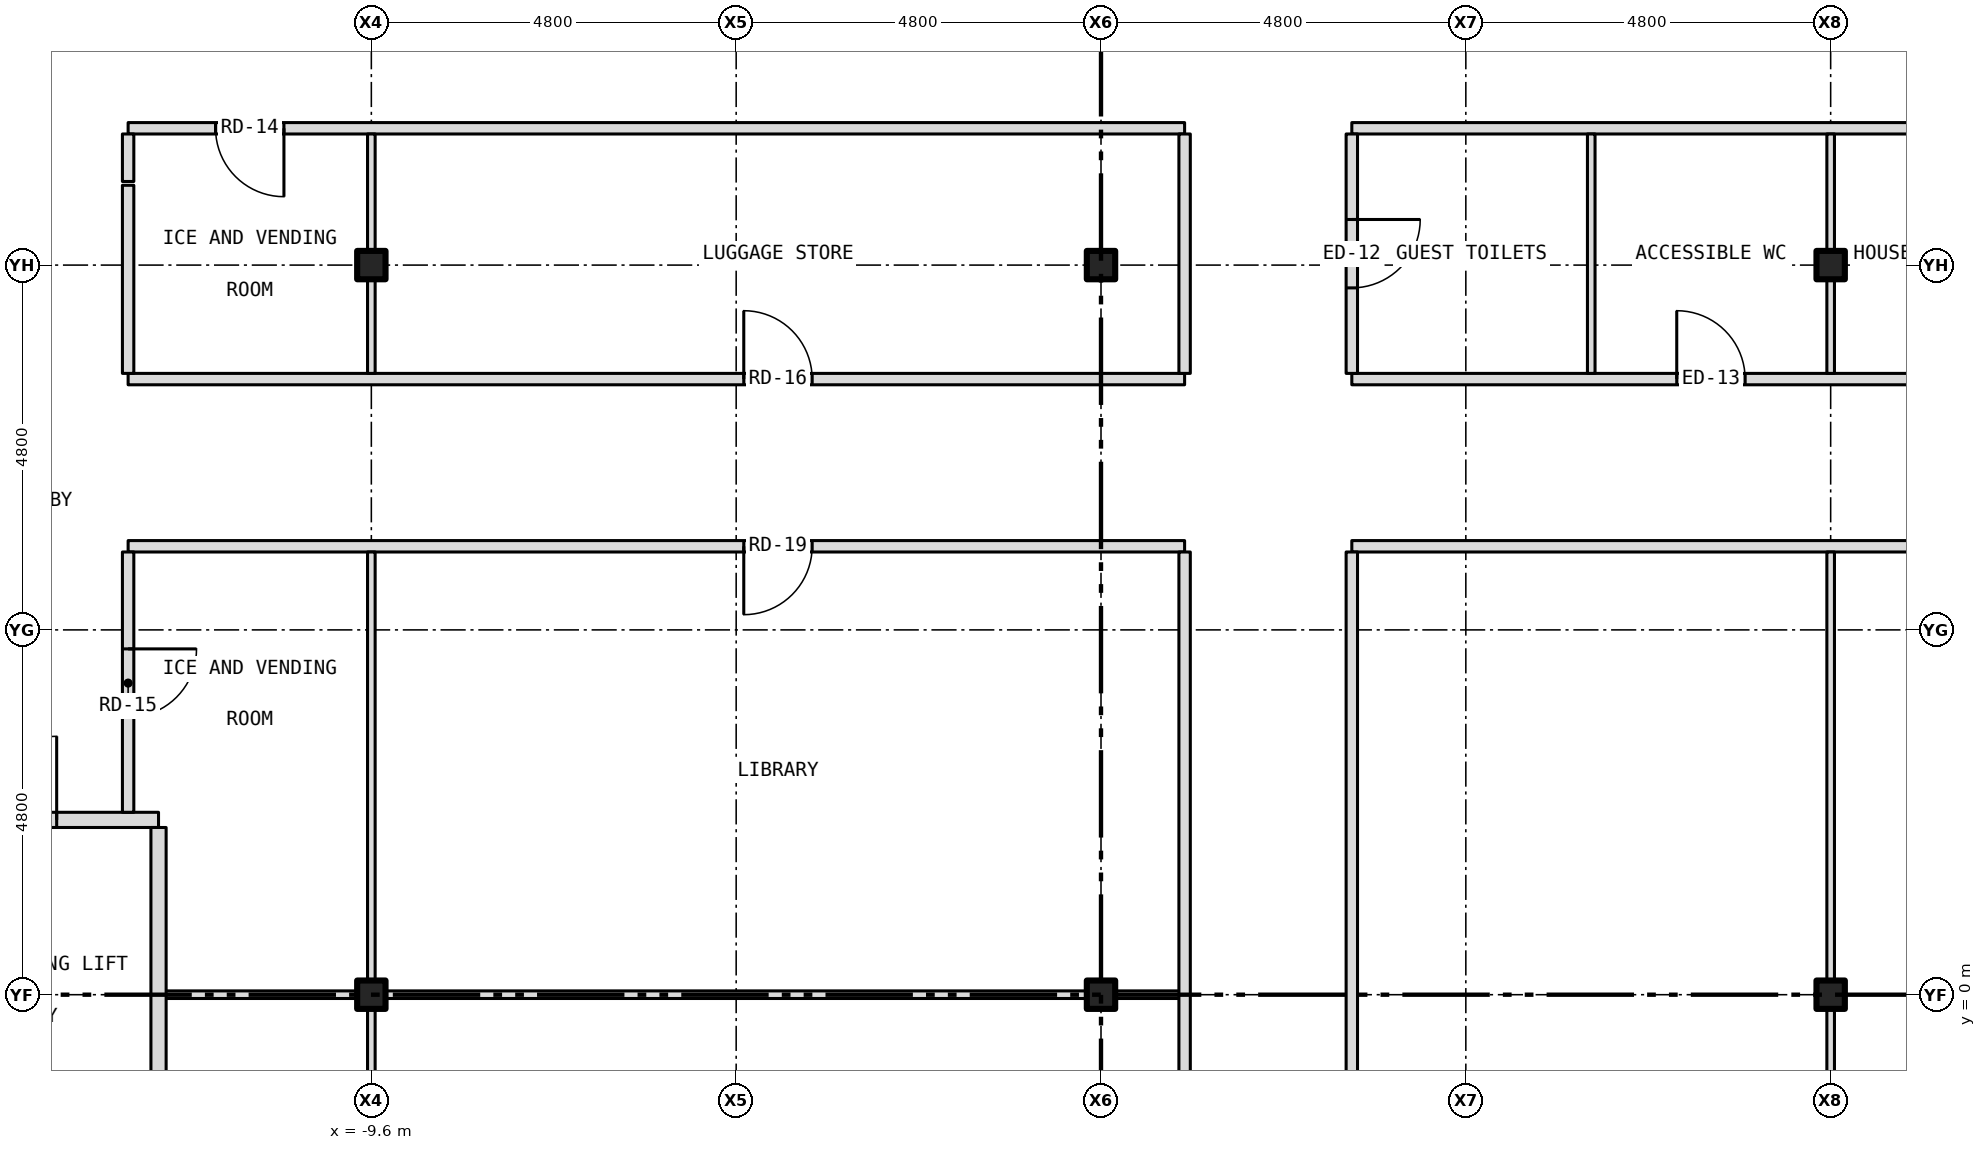
"""IFC4 building model, lengths in metres.
Left out: names, types, materials, properties, quantities, classifications, styles, units other than length and angle.
Written with IfcOpenShell. Run it as: python <this file> out.ifc"""

import sys

from ifc_helpers import new_model, si_unit, direction, frame, frame_2d, origin, origin_2d, place, context, subcontext, project, spatial, rectangle, i_section, extrude, element, fill, save


model = new_model("IFC4")
c1 = context("Model", 3, precision=1e-05, world=origin(), true_north=direction((0.0, 1.0)))
c2 = subcontext(c1, "Body", "Model", "MODEL_VIEW")
j1 = project(units=[si_unit("LENGTHUNIT", "METRE"), si_unit("PLANEANGLEUNIT", "RADIAN")], contexts=[c1])
p1 = place(None, origin())
s1 = spatial("IfcSite", under=j1, at=p1, CompositionType="ELEMENT")
p2 = place(p1, origin())
s2 = spatial("IfcBuilding", under=s1, at=p2, CompositionType="ELEMENT")
p3 = place(p2, frame((0.0, 0.0, 169.0)))
s3 = spatial("IfcBuildingStorey", under=s2, at=p3, CompositionType="ELEMENT", Elevation=169.0)
for number, where, z_axis, x_axis in (
    (1, (-9.6, 0.0, -0.15), (0.0, 0.0, 1.0), (1.0, 0.0, 0.0)),
    (2, (-9.6, 9.6, -0.15), (0.0, 0.0, 1.0), (1.0, 0.0, 0.0)),
    (3, (0.0, 0.0, -0.15), (0.0, 0.0, 1.0), (1.0, 0.0, 0.0)),
    (4, (0.0, 9.6, -0.15), (0.0, 0.0, 1.0), (1.0, 0.0, 0.0)),
    (5, (9.6, 0.0, -0.15), (0.0, 0.0, 1.0), (1.0, 0.0, 0.0)),
    (6, (9.6, 9.6, -0.15), (0.0, 0.0, 1.0), (1.0, 0.0, 0.0)),
):
    element("IfcColumn", number, at=place(p3, frame(where, z_axis=z_axis, x_axis=x_axis)), inside=s3, PredefinedType="COLUMN", context=c2, shape_type="SweptSolid", body=[
        extrude(i_section(OverallWidth=0.373, OverallDepth=0.373, WebThickness=0.016, FlangeThickness=0.026, at=origin_2d()), origin(), (0.0, 0.0, 1.0), 3.5),
    ])
p4 = place(p3, frame((-12.4, 0.0, 0.0), z_axis=(0.0, 0.0, 1.0), x_axis=(1.0, 0.0, 0.0)))
e7 = element("IfcWall", 7, at=p4, inside=s3, PredefinedType="PARTITIONING", context=c2, shape_type="SweptSolid", body=[
    extrude(rectangle(XDim=2.613, YDim=0.1, at=frame_2d((1.306, 0.0))), origin(), (0.0, 0.0, 1.0), 2.728),
])
p5 = place(p3, frame((-9.787, 0.0, 0.0), z_axis=(0.0, 0.0, 1.0), x_axis=(1.0, 0.0, 0.0)))
e8 = element("IfcWall", 8, at=p5, inside=s3, PredefinedType="PARTITIONING", context=c2, shape_type="SweptSolid", body=[
    extrude(rectangle(XDim=0.374, YDim=0.1, at=frame_2d((0.187, 0.0))), origin(), (0.0, 0.0, 1.0), 3.35),
])
p6 = place(p3, frame((-9.413, 0.0, 0.0), z_axis=(0.0, 0.0, 1.0), x_axis=(1.0, 0.0, 0.0)))
e9 = element("IfcWall", 9, at=p6, inside=s3, PredefinedType="PARTITIONING", context=c2, shape_type="SweptSolid", body=[
    extrude(rectangle(XDim=9.226, YDim=0.1, at=frame_2d((4.613, 0.0))), origin(), (0.0, 0.0, 1.0), 2.728),
])
p7 = place(p3, frame((-0.187, 0.0, 0.0), z_axis=(0.0, 0.0, 1.0), x_axis=(1.0, 0.0, 0.0)))
e10 = element("IfcWall", 10, at=p7, inside=s3, PredefinedType="PARTITIONING", context=c2, shape_type="SweptSolid", body=[
    extrude(rectangle(XDim=0.374, YDim=0.1, at=frame_2d((0.187, 0.0))), origin(), (0.0, 0.0, 1.0), 3.35),
])
p8 = place(p3, frame((0.187, 0.0, 0.0), z_axis=(0.0, 0.0, 1.0), x_axis=(1.0, 0.0, 0.0)))
e11 = element("IfcWall", 11, at=p8, inside=s3, PredefinedType="PARTITIONING", context=c2, shape_type="SweptSolid", body=[
    extrude(rectangle(XDim=0.913, YDim=0.1, at=frame_2d((0.457, 0.0))), origin(), (0.0, 0.0, 1.0), 2.728),
])
p9 = place(p3, frame((-15.68, 2.3, 0.0), z_axis=(0.0, 0.0, 1.0), x_axis=(1.0, 0.0, 0.0)))
e12 = element("IfcWall", 12, at=p9, inside=s3, PredefinedType="PARTITIONING", context=c2, shape_type="SweptSolid", body=[
    extrude(rectangle(XDim=3.28, YDim=0.2, at=frame_2d((1.64, 0.0))), origin(), (0.0, 0.0, 1.0), 3.35),
])
p10 = place(p9, frame((0.84, 0.0, 0.0)))
e13 = element("IfcOpeningElement", 13, at=p10, cuts=e12, PredefinedType="OPENING", context=c2, shape_type="SweptSolid", body=[
    extrude(rectangle(XDim=1.1, YDim=2.1, at=frame_2d((0.55, 1.05))), frame((0.0, 0.112, 0.0), z_axis=(0.0, -1.0, 0.0), x_axis=(1.0, 0.0, 0.0)), (0.0, 0.0, 1.0), 0.224),
])
p11 = place(p3, frame((-12.8, 5.9, 0.0), z_axis=(0.0, 0.0, 1.0), x_axis=(1.0, 0.0, 0.0)))
e14 = element("IfcWall", 14, at=p11, inside=s3, PredefinedType="PARTITIONING", context=c2, shape_type="SweptSolid", body=[
    extrude(rectangle(XDim=13.9, YDim=0.15, at=frame_2d((6.95, 0.0))), origin(), (0.0, 0.0, 1.0), 3.35),
])
p12 = place(p11, frame((8.1, 0.0, 0.0)))
e15 = element("IfcOpeningElement", 15, at=p12, cuts=e14, PredefinedType="OPENING", context=c2, shape_type="SweptSolid", body=[
    extrude(rectangle(XDim=0.9, YDim=2.1, at=frame_2d((0.45, 1.05))), frame((0.0, 0.087, 0.0), z_axis=(0.0, -1.0, 0.0), x_axis=(1.0, 0.0, 0.0)), (0.0, 0.0, 1.0), 0.174),
])
p13 = place(p3, frame((3.3, 5.9, 0.0), z_axis=(0.0, 0.0, 1.0), x_axis=(1.0, 0.0, 0.0)))
e16 = element("IfcWall", 16, at=p13, inside=s3, PredefinedType="PARTITIONING", context=c2, shape_type="SweptSolid", body=[
    extrude(rectangle(XDim=9.5, YDim=0.15, at=frame_2d((4.75, 0.0))), origin(), (0.0, 0.0, 1.0), 3.35),
])
p14 = place(p3, frame((-12.8, 8.1, 0.0), z_axis=(0.0, 0.0, 1.0), x_axis=(1.0, 0.0, 0.0)))
e17 = element("IfcWall", 17, at=p14, inside=s3, PredefinedType="PARTITIONING", context=c2, shape_type="SweptSolid", body=[
    extrude(rectangle(XDim=13.9, YDim=0.15, at=frame_2d((6.95, 0.0))), origin(), (0.0, 0.0, 1.0), 3.35),
])
p15 = place(p14, frame((8.1, 0.0, 0.0)))
e18 = element("IfcOpeningElement", 18, at=p15, cuts=e17, PredefinedType="OPENING", context=c2, shape_type="SweptSolid", body=[
    extrude(rectangle(XDim=0.9, YDim=2.1, at=frame_2d((0.45, 1.05))), frame((0.0, 0.087, 0.0), z_axis=(0.0, -1.0, 0.0), x_axis=(1.0, 0.0, 0.0)), (0.0, 0.0, 1.0), 0.174),
])
p16 = place(p3, frame((3.3, 8.1, 0.0), z_axis=(0.0, 0.0, 1.0), x_axis=(1.0, 0.0, 0.0)))
e19 = element("IfcWall", 19, at=p16, inside=s3, PredefinedType="PARTITIONING", context=c2, shape_type="SweptSolid", body=[
    extrude(rectangle(XDim=9.5, YDim=0.15, at=frame_2d((4.75, 0.0))), origin(), (0.0, 0.0, 1.0), 3.35),
])
p17 = place(p16, frame((7.45, 0.0, 0.0)))
e20 = element("IfcOpeningElement", 20, at=p17, cuts=e19, PredefinedType="OPENING", context=c2, shape_type="SweptSolid", body=[
    extrude(rectangle(XDim=0.9, YDim=2.1, at=frame_2d((0.45, 1.05))), frame((0.0, 0.087, 0.0), z_axis=(0.0, -1.0, 0.0), x_axis=(1.0, 0.0, 0.0)), (0.0, 0.0, 1.0), 0.174),
])
p18 = place(p16, frame((4.275, 0.0, 0.0)))
e21 = element("IfcOpeningElement", 21, at=p18, cuts=e19, PredefinedType="OPENING", context=c2, shape_type="SweptSolid", body=[
    extrude(rectangle(XDim=0.9, YDim=2.1, at=frame_2d((0.45, 1.05))), frame((0.0, 0.087, 0.0), z_axis=(0.0, -1.0, 0.0), x_axis=(1.0, 0.0, 0.0)), (0.0, 0.0, 1.0), 0.174),
])
p19 = place(p3, frame((-12.8, 11.4, 0.0), z_axis=(0.0, 0.0, 1.0), x_axis=(1.0, 0.0, 0.0)))
e22 = element("IfcWall", 22, at=p19, inside=s3, PredefinedType="PARTITIONING", context=c2, shape_type="SweptSolid", body=[
    extrude(rectangle(XDim=13.9, YDim=0.15, at=frame_2d((6.95, 0.0))), origin(), (0.0, 0.0, 1.0), 3.35),
])
p20 = place(p19, frame((1.15, 0.0, 0.0)))
e23 = element("IfcOpeningElement", 23, at=p20, cuts=e22, PredefinedType="OPENING", context=c2, shape_type="SweptSolid", body=[
    extrude(rectangle(XDim=0.9, YDim=2.1, at=frame_2d((0.45, 1.05))), frame((0.0, 0.087, 0.0), z_axis=(0.0, -1.0, 0.0), x_axis=(1.0, 0.0, 0.0)), (0.0, 0.0, 1.0), 0.174),
])
p21 = place(p3, frame((3.3, 11.4, 0.0), z_axis=(0.0, 0.0, 1.0), x_axis=(1.0, 0.0, 0.0)))
e24 = element("IfcWall", 24, at=p21, inside=s3, PredefinedType="PARTITIONING", context=c2, shape_type="SweptSolid", body=[
    extrude(rectangle(XDim=9.5, YDim=0.15, at=frame_2d((4.75, 0.0))), origin(), (0.0, 0.0, 1.0), 3.35),
])
p22 = place(p3, frame((-12.8, 2.4, 0.0), z_axis=(0.0, 0.0, 1.0), x_axis=(0.0, 1.0, 0.0)))
e25 = element("IfcWall", 25, at=p22, inside=s3, PredefinedType="PARTITIONING", context=c2, shape_type="SweptSolid", body=[
    extrude(rectangle(XDim=3.425, YDim=0.15, at=frame_2d((1.712, 0.0))), origin(), (0.0, 0.0, 1.0), 3.35),
])
p23 = place(p22, frame((1.25, 0.0, 0.0)))
e26 = element("IfcOpeningElement", 26, at=p23, cuts=e25, PredefinedType="OPENING", context=c2, shape_type="SweptSolid", body=[
    extrude(rectangle(XDim=0.9, YDim=2.1, at=frame_2d((0.45, 1.05))), frame((0.0, 0.087, 0.0), z_axis=(0.0, -1.0, 0.0), x_axis=(1.0, 0.0, 0.0)), (0.0, 0.0, 1.0), 0.174),
])
p24 = place(p3, frame((-12.8, 8.175, 0.0), z_axis=(0.0, 0.0, 1.0), x_axis=(0.0, 1.0, 0.0)))
e27 = element("IfcWall", 27, at=p24, inside=s3, PredefinedType="PARTITIONING", context=c2, shape_type="SweptSolid", body=[
    extrude(rectangle(XDim=2.475, YDim=0.15, at=frame_2d((1.237, 0.0))), origin(), (0.0, 0.0, 1.0), 3.35),
])
p25 = place(p3, frame((-12.8, 10.7, 0.0), z_axis=(0.0, 0.0, 1.0), x_axis=(0.0, 1.0, 0.0)))
e28 = element("IfcWall", 28, at=p25, inside=s3, PredefinedType="PARTITIONING", context=c2, shape_type="SweptSolid", body=[
    extrude(rectangle(XDim=0.625, YDim=0.15, at=frame_2d((0.312, 0.0))), origin(), (0.0, 0.0, 1.0), 3.35),
])
p26 = place(p3, frame((-12.4, -1.8, 0.0), z_axis=(0.0, 0.0, 1.0), x_axis=(0.0, 1.0, 0.0)))
e29 = element("IfcWall", 29, at=p26, inside=s3, PredefinedType="PARTITIONING", context=c2, shape_type="SweptSolid", body=[
    extrude(rectangle(XDim=4.0, YDim=0.2, at=frame_2d((2.0, 0.0))), origin(), (0.0, 0.0, 1.0), 3.35),
])
p27 = place(p3, frame((-9.6, -9.413, 0.0), z_axis=(0.0, 0.0, 1.0), x_axis=(0.0, 1.0, 0.0)))
e30 = element("IfcWall", 30, at=p27, inside=s3, PredefinedType="PARTITIONING", context=c2, shape_type="SweptSolid", body=[
    extrude(rectangle(XDim=9.363, YDim=0.1, at=frame_2d((4.682, 0.0))), origin(), (0.0, 0.0, 1.0), 2.728),
])
p28 = place(p3, frame((-9.6, 0.05, 0.0), z_axis=(0.0, 0.0, 1.0), x_axis=(0.0, 1.0, 0.0)))
e31 = element("IfcWall", 31, at=p28, inside=s3, PredefinedType="PARTITIONING", context=c2, shape_type="SweptSolid", body=[
    extrude(rectangle(XDim=5.775, YDim=0.1, at=frame_2d((2.887, 0.0))), origin(), (0.0, 0.0, 1.0), 2.728),
])
p29 = place(p3, frame((-9.6, 8.175, 0.0), z_axis=(0.0, 0.0, 1.0), x_axis=(0.0, 1.0, 0.0)))
e32 = element("IfcWall", 32, at=p29, inside=s3, PredefinedType="PARTITIONING", context=c2, shape_type="SweptSolid", body=[
    extrude(rectangle(XDim=1.238, YDim=0.1, at=frame_2d((0.619, 0.0))), origin(), (0.0, 0.0, 1.0), 2.728),
])
p30 = place(p3, frame((-9.6, 9.413, 0.0), z_axis=(0.0, 0.0, 1.0), x_axis=(0.0, 1.0, 0.0)))
e33 = element("IfcWall", 33, at=p30, inside=s3, PredefinedType="PARTITIONING", context=c2, shape_type="SweptSolid", body=[
    extrude(rectangle(XDim=0.374, YDim=0.1, at=frame_2d((0.187, 0.0))), origin(), (0.0, 0.0, 1.0), 3.35),
])
p31 = place(p3, frame((-9.6, 9.787, 0.0), z_axis=(0.0, 0.0, 1.0), x_axis=(0.0, 1.0, 0.0)))
e34 = element("IfcWall", 34, at=p31, inside=s3, PredefinedType="PARTITIONING", context=c2, shape_type="SweptSolid", body=[
    extrude(rectangle(XDim=1.538, YDim=0.1, at=frame_2d((0.769, 0.0))), origin(), (0.0, 0.0, 1.0), 2.728),
])
p32 = place(p3, frame((1.1, -11.325, 0.0), z_axis=(0.0, 0.0, 1.0), x_axis=(0.0, 1.0, 0.0)))
e35 = element("IfcWall", 35, at=p32, inside=s3, PredefinedType="PARTITIONING", context=c2, shape_type="SweptSolid", body=[
    extrude(rectangle(XDim=17.15, YDim=0.15, at=frame_2d((8.575, 0.0))), origin(), (0.0, 0.0, 1.0), 3.35),
])
p33 = place(p32, frame((5.175, 0.0, 0.0)))
e36 = element("IfcOpeningElement", 36, at=p33, cuts=e35, PredefinedType="OPENING", context=c2, shape_type="SweptSolid", body=[
    extrude(rectangle(XDim=0.9, YDim=2.1, at=frame_2d((0.45, 1.05))), frame((0.0, 0.087, 0.0), z_axis=(0.0, -1.0, 0.0), x_axis=(1.0, 0.0, 0.0)), (0.0, 0.0, 1.0), 0.174),
])
p34 = place(p3, frame((1.1, 8.175, 0.0), z_axis=(0.0, 0.0, 1.0), x_axis=(0.0, 1.0, 0.0)))
e37 = element("IfcWall", 37, at=p34, inside=s3, PredefinedType="PARTITIONING", context=c2, shape_type="SweptSolid", body=[
    extrude(rectangle(XDim=3.15, YDim=0.15, at=frame_2d((1.575, 0.0))), origin(), (0.0, 0.0, 1.0), 3.35),
])
p35 = place(p3, frame((3.3, -11.325, 0.0), z_axis=(0.0, 0.0, 1.0), x_axis=(0.0, 1.0, 0.0)))
e38 = element("IfcWall", 38, at=p35, inside=s3, PredefinedType="PARTITIONING", context=c2, shape_type="SweptSolid", body=[
    extrude(rectangle(XDim=17.15, YDim=0.15, at=frame_2d((8.575, 0.0))), origin(), (0.0, 0.0, 1.0), 3.35),
])
p36 = place(p35, frame((8.125, 0.0, 0.0)))
e39 = element("IfcOpeningElement", 39, at=p36, cuts=e38, PredefinedType="OPENING", context=c2, shape_type="SweptSolid", body=[
    extrude(rectangle(XDim=0.9, YDim=2.1, at=frame_2d((0.45, 1.05))), frame((0.0, 0.087, 0.0), z_axis=(0.0, -1.0, 0.0), x_axis=(1.0, 0.0, 0.0)), (0.0, 0.0, 1.0), 0.174),
])
p37 = place(p3, frame((3.3, 8.175, 0.0), z_axis=(0.0, 0.0, 1.0), x_axis=(0.0, 1.0, 0.0)))
e40 = element("IfcWall", 40, at=p37, inside=s3, PredefinedType="PARTITIONING", context=c2, shape_type="SweptSolid", body=[
    extrude(rectangle(XDim=3.15, YDim=0.15, at=frame_2d((1.575, 0.0))), origin(), (0.0, 0.0, 1.0), 3.35),
])
p38 = place(p37, frame((1.125, 0.0, 0.0)))
e41 = element("IfcOpeningElement", 41, at=p38, cuts=e40, PredefinedType="OPENING", context=c2, shape_type="SweptSolid", body=[
    extrude(rectangle(XDim=0.9, YDim=2.1, at=frame_2d((0.45, 1.05))), frame((0.0, 0.087, 0.0), z_axis=(0.0, -1.0, 0.0), x_axis=(1.0, 0.0, 0.0)), (0.0, 0.0, 1.0), 0.174),
])
p39 = place(p3, frame((6.45, 8.175, 0.0), z_axis=(0.0, 0.0, 1.0), x_axis=(0.0, 1.0, 0.0)))
e42 = element("IfcWall", 42, at=p39, inside=s3, PredefinedType="PARTITIONING", context=c2, shape_type="SweptSolid", body=[
    extrude(rectangle(XDim=3.15, YDim=0.1, at=frame_2d((1.575, 0.0))), origin(), (0.0, 0.0, 1.0), 3.35),
])
p40 = place(p3, frame((9.6, -9.413, 0.0), z_axis=(0.0, 0.0, 1.0), x_axis=(0.0, 1.0, 0.0)))
e43 = element("IfcWall", 43, at=p40, inside=s3, PredefinedType="PARTITIONING", context=c2, shape_type="SweptSolid", body=[
    extrude(rectangle(XDim=9.226, YDim=0.1, at=frame_2d((4.613, 0.0))), origin(), (0.0, 0.0, 1.0), 2.728),
])
p41 = place(p3, frame((9.6, -0.187, 0.0), z_axis=(0.0, 0.0, 1.0), x_axis=(0.0, 1.0, 0.0)))
e44 = element("IfcWall", 44, at=p41, inside=s3, PredefinedType="PARTITIONING", context=c2, shape_type="SweptSolid", body=[
    extrude(rectangle(XDim=0.374, YDim=0.1, at=frame_2d((0.187, 0.0))), origin(), (0.0, 0.0, 1.0), 3.35),
])
p42 = place(p3, frame((9.6, 0.187, 0.0), z_axis=(0.0, 0.0, 1.0), x_axis=(0.0, 1.0, 0.0)))
e45 = element("IfcWall", 45, at=p42, inside=s3, PredefinedType="PARTITIONING", context=c2, shape_type="SweptSolid", body=[
    extrude(rectangle(XDim=5.638, YDim=0.1, at=frame_2d((2.819, 0.0))), origin(), (0.0, 0.0, 1.0), 2.728),
])
p43 = place(p3, frame((9.6, 8.175, 0.0), z_axis=(0.0, 0.0, 1.0), x_axis=(0.0, 1.0, 0.0)))
e46 = element("IfcWall", 46, at=p43, inside=s3, PredefinedType="PARTITIONING", context=c2, shape_type="SweptSolid", body=[
    extrude(rectangle(XDim=1.238, YDim=0.1, at=frame_2d((0.619, 0.0))), origin(), (0.0, 0.0, 1.0), 2.728),
])
p44 = place(p3, frame((9.6, 9.413, 0.0), z_axis=(0.0, 0.0, 1.0), x_axis=(0.0, 1.0, 0.0)))
e47 = element("IfcWall", 47, at=p44, inside=s3, PredefinedType="PARTITIONING", context=c2, shape_type="SweptSolid", body=[
    extrude(rectangle(XDim=0.374, YDim=0.1, at=frame_2d((0.187, 0.0))), origin(), (0.0, 0.0, 1.0), 3.35),
])
p45 = place(p3, frame((9.6, 9.787, 0.0), z_axis=(0.0, 0.0, 1.0), x_axis=(0.0, 1.0, 0.0)))
e48 = element("IfcWall", 48, at=p45, inside=s3, PredefinedType="PARTITIONING", context=c2, shape_type="SweptSolid", body=[
    extrude(rectangle(XDim=1.538, YDim=0.1, at=frame_2d((0.769, 0.0))), origin(), (0.0, 0.0, 1.0), 2.728),
])
p46 = place(p10, origin())
e49 = element("IfcDoor", 49, at=p46, inside=s3, OperationType="SINGLE_SWING_RIGHT", PredefinedType="DOOR", context=c2, shape_type="SweptSolid", body=[
    extrude(rectangle(XDim=1.1, YDim=2.1, at=frame_2d((0.55, 1.05))), frame((0.0, 0.025, 0.0), z_axis=(0.0, -1.0, 0.0), x_axis=(1.0, 0.0, 0.0)), (0.0, 0.0, 1.0), 0.05),
])
fill(e13, e49)
p47 = place(p20, origin())
e50 = element("IfcDoor", 50, at=p47, inside=s3, OperationType="SINGLE_SWING_RIGHT", PredefinedType="DOOR", context=c2, shape_type="SweptSolid", body=[
    extrude(rectangle(XDim=0.9, YDim=2.1, at=frame_2d((0.45, 1.05))), frame((0.0, 0.025, 0.0), z_axis=(0.0, -1.0, 0.0), x_axis=(1.0, 0.0, 0.0)), (0.0, 0.0, 1.0), 0.05),
])
fill(e23, e50)
p48 = place(p23, origin())
e51 = element("IfcDoor", 51, at=p48, inside=s3, OperationType="SINGLE_SWING_RIGHT", PredefinedType="DOOR", context=c2, shape_type="SweptSolid", body=[
    extrude(rectangle(XDim=0.9, YDim=2.1, at=frame_2d((0.45, 1.05))), frame((0.0, 0.025, 0.0), z_axis=(0.0, -1.0, 0.0), x_axis=(1.0, 0.0, 0.0)), (0.0, 0.0, 1.0), 0.05),
])
fill(e26, e51)
p49 = place(p38, origin())
e52 = element("IfcDoor", 52, at=p49, inside=s3, OperationType="SINGLE_SWING_RIGHT", PredefinedType="DOOR", context=c2, shape_type="SweptSolid", body=[
    extrude(rectangle(XDim=0.9, YDim=2.1, at=frame_2d((0.45, 1.05))), frame((0.0, 0.025, 0.0), z_axis=(0.0, -1.0, 0.0), x_axis=(1.0, 0.0, 0.0)), (0.0, 0.0, 1.0), 0.05),
])
fill(e41, e52)
p50 = place(p18, origin())
e53 = element("IfcDoor", 53, at=p50, inside=s3, OperationType="SINGLE_SWING_LEFT", PredefinedType="DOOR", context=c2, shape_type="SweptSolid", body=[
    extrude(rectangle(XDim=0.9, YDim=2.1, at=frame_2d((0.45, 1.05))), frame((0.0, 0.025, 0.0), z_axis=(0.0, -1.0, 0.0), x_axis=(1.0, 0.0, 0.0)), (0.0, 0.0, 1.0), 0.05),
])
fill(e21, e53)
p51 = place(p15, origin())
e54 = element("IfcDoor", 54, at=p51, inside=s3, OperationType="SINGLE_SWING_LEFT", PredefinedType="DOOR", context=c2, shape_type="SweptSolid", body=[
    extrude(rectangle(XDim=0.9, YDim=2.1, at=frame_2d((0.45, 1.05))), frame((0.0, 0.025, 0.0), z_axis=(0.0, -1.0, 0.0), x_axis=(1.0, 0.0, 0.0)), (0.0, 0.0, 1.0), 0.05),
])
fill(e18, e54)
p52 = place(p12, origin())
e55 = element("IfcDoor", 55, at=p52, inside=s3, OperationType="SINGLE_SWING_LEFT", PredefinedType="DOOR", context=c2, shape_type="SweptSolid", body=[
    extrude(rectangle(XDim=0.9, YDim=2.1, at=frame_2d((0.45, 1.05))), frame((0.0, 0.025, 0.0), z_axis=(0.0, -1.0, 0.0), x_axis=(1.0, 0.0, 0.0)), (0.0, 0.0, 1.0), 0.05),
])
fill(e15, e55)
save(model, sys.argv[1])
